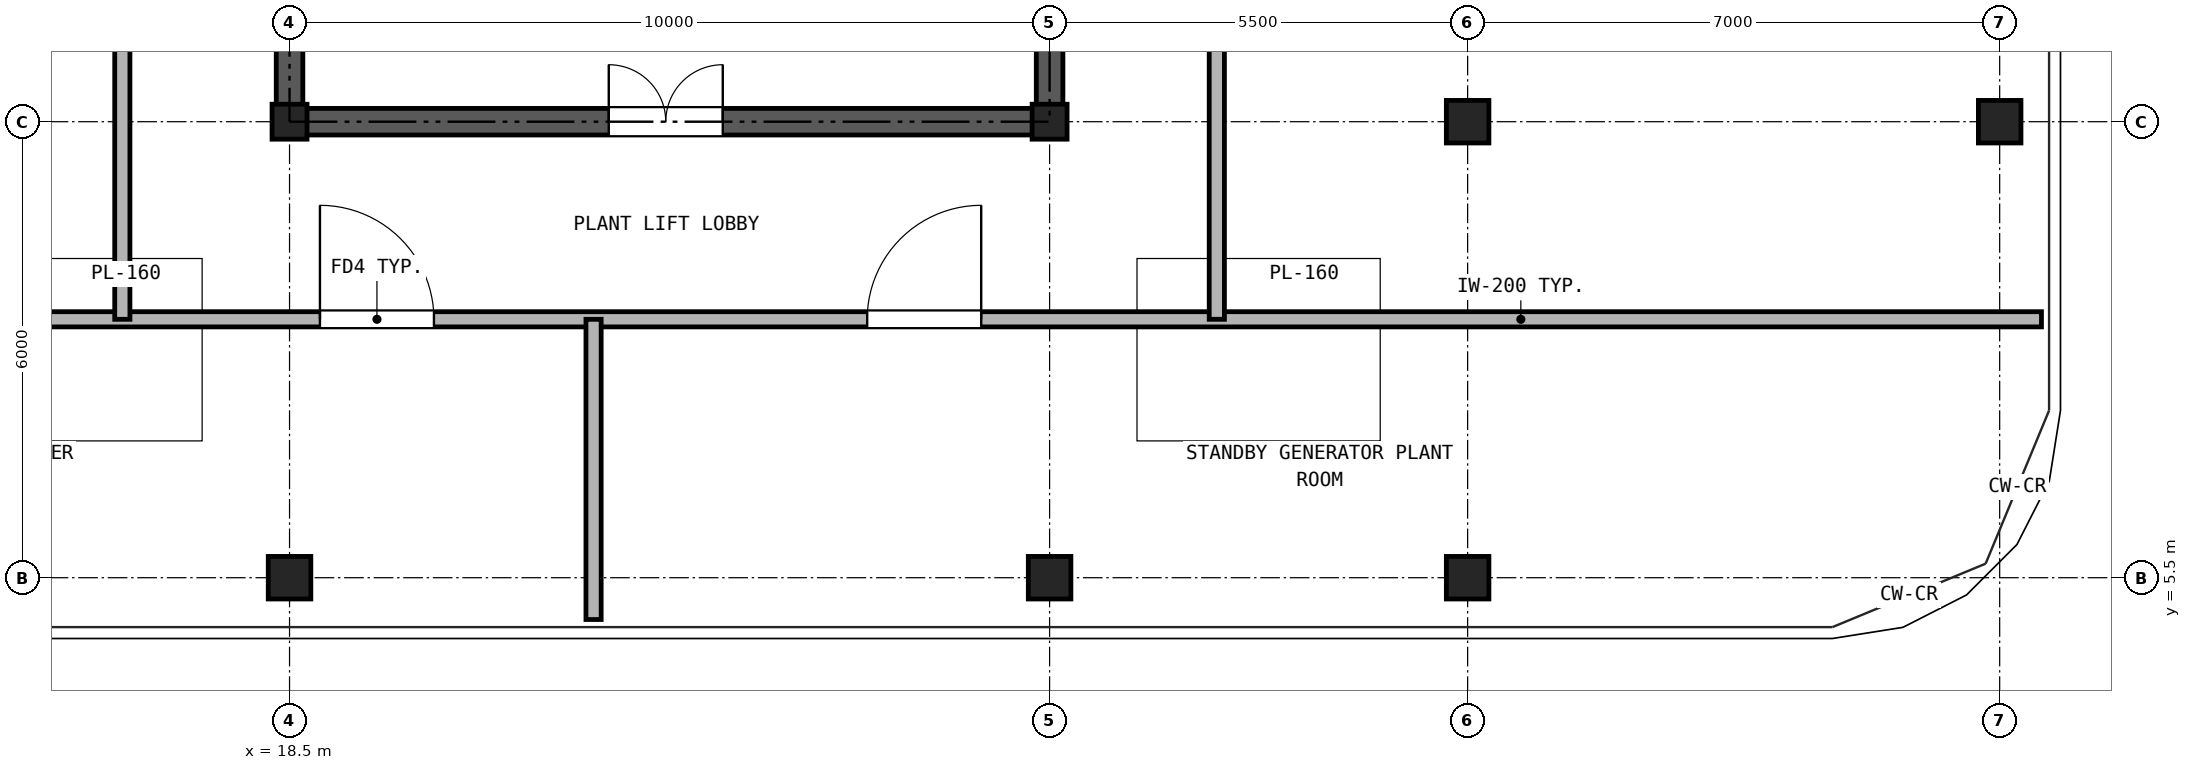
"""IFC4 building model, lengths in metres.
Left out: names, types, materials, properties, quantities, classifications, styles, units other than length and angle.
Written with IfcOpenShell. Run it as: python <this file> out.ifc"""

import sys

from ifc_helpers import new_model, si_unit, direction, frame, frame_2d, origin, origin_2d, place, context, subcontext, project, spatial, rectangle, hollow_rectangle, extrude, source, transform, mapped, element, fill, save


model = new_model("IFC4")
c1 = context("Model", 3, precision=1e-05, world=origin(), true_north=direction((0.0, 1.0)))
c2 = subcontext(c1, "Body", "Model", "MODEL_VIEW")
j1 = project(units=[si_unit("LENGTHUNIT", "METRE"), si_unit("PLANEANGLEUNIT", "RADIAN")], contexts=[c1])
p1 = place(None, origin())
s1 = spatial("IfcSite", under=j1, at=p1, CompositionType="ELEMENT")
p2 = place(p1, origin())
s2 = spatial("IfcBuilding", under=s1, at=p2, CompositionType="ELEMENT")
p3 = place(p2, frame((0.0, 0.0, 274.9)))
s3 = spatial("IfcBuildingStorey", under=s2, at=p3, CompositionType="ELEMENT", Elevation=274.9)
m1 = source(origin(), c2, "Body", "SweptSolid", [
    extrude(hollow_rectangle(XDim=0.56, YDim=0.56, WallThickness=0.03, at=origin_2d()), origin(), (0.0, 0.0, 1.0), 3.38),
])
for number, where, z_axis, x_axis in (
    (1, (18.5, 5.5, 0.0), (0.0, 0.0, 1.0), (1.0, 0.0, 0.0)),
    (2, (28.5, 5.5, 0.0), (0.0, 0.0, 1.0), (1.0, 0.0, 0.0)),
    (3, (34.0, 5.5, 0.0), (0.0, 0.0, 1.0), (1.0, 0.0, 0.0)),
    (4, (41.0, 11.5, 0.0), (0.0, 0.0, 1.0), (1.0, 0.0, 0.0)),
):
    element("IfcColumn", number, at=place(p3, frame(where, z_axis=z_axis, x_axis=x_axis)), inside=s3, PredefinedType="COLUMN", context=c2, shape_type="MappedRepresentation", body=[
        mapped(m1, transform((0.0, 0.0, 0.0), x_axis=(1.0, 0.0, 0.0), y_axis=(0.0, 1.0, 0.0), z_axis=(0.0, 0.0, 1.0), scale=1.0)),
    ])
m2 = source(origin(), c2, "Body", "SweptSolid", [
    extrude(hollow_rectangle(XDim=0.46, YDim=0.46, WallThickness=0.025, at=origin_2d()), origin(), (0.0, 0.0, 1.0), 3.38),
])
for number, where, z_axis, x_axis in (
    (5, (18.5, 11.5, 0.0), (0.0, 0.0, 1.0), (1.0, 0.0, 0.0)),
    (6, (28.5, 11.5, 0.0), (0.0, 0.0, 1.0), (1.0, 0.0, 0.0)),
):
    element("IfcColumn", number, at=place(p3, frame(where, z_axis=z_axis, x_axis=x_axis)), inside=s3, PredefinedType="COLUMN", context=c2, shape_type="MappedRepresentation", body=[
        mapped(m2, transform((0.0, 0.0, 0.0), x_axis=(1.0, 0.0, 0.0), y_axis=(0.0, 1.0, 0.0), z_axis=(0.0, 0.0, 1.0), scale=1.0)),
    ])
p4 = place(p3, frame((34.0, 11.5, 0.0), z_axis=(0.0, 0.0, 1.0), x_axis=(1.0, 0.0, 0.0)))
e7 = element("IfcColumn", 7, at=p4, inside=s3, PredefinedType="COLUMN", context=c2, shape_type="MappedRepresentation", body=[
    mapped(m1, transform((0.0, 0.0, 0.0), x_axis=(1.0, 0.0, 0.0), y_axis=(0.0, 1.0, 0.0), z_axis=(0.0, 0.0, 1.0), scale=1.0)),
])
p5 = place(p3, frame((18.325, 11.5, 0.0), z_axis=(0.0, 0.0, 1.0), x_axis=(1.0, 0.0, 0.0)))
e8 = element("IfcWall", 8, at=p5, inside=s3, PredefinedType="SHEAR", context=c2, shape_type="SweptSolid", body=[
    extrude(rectangle(XDim=10.35, YDim=0.35, at=frame_2d((5.175, 0.0))), origin(), (0.0, 0.0, 1.0), 3.38),
])
p6 = place(p5, frame((4.375, 0.0, 0.0)))
e9 = element("IfcOpeningElement", 9, at=p6, cuts=e8, PredefinedType="OPENING", context=c2, shape_type="SweptSolid", body=[
    extrude(rectangle(XDim=1.5, YDim=2.25, at=frame_2d((0.75, 1.125))), frame((0.0, 0.185, 0.0), z_axis=(0.0, -1.0, 0.0), x_axis=(1.0, 0.0, 0.0)), (0.0, 0.0, 1.0), 0.37),
])
p7 = place(p3, frame((18.5, 11.675, 0.0), z_axis=(0.0, 0.0, 1.0), x_axis=(0.0, 1.0, 0.0)))
e10 = element("IfcWall", 10, at=p7, inside=s3, PredefinedType="SHEAR", context=c2, shape_type="SweptSolid", body=[
    extrude(rectangle(XDim=16.9, YDim=0.35, at=frame_2d((8.45, 0.0))), origin(), (0.0, 0.0, 1.0), 3.38),
])
p8 = place(p7, frame((7.475, 0.0, 0.0)))
e11 = element("IfcOpeningElement", 11, at=p8, cuts=e10, PredefinedType="OPENING", context=c2, shape_type="SweptSolid", body=[
    extrude(rectangle(XDim=1.15, YDim=2.2, at=frame_2d((0.575, 1.1))), frame((0.0, 0.185, 0.0), z_axis=(0.0, -1.0, 0.0), x_axis=(1.0, 0.0, 0.0)), (0.0, 0.0, 1.0), 0.37),
])
p9 = place(p3, frame((28.5, 11.675, 0.0), z_axis=(0.0, 0.0, 1.0), x_axis=(0.0, 1.0, 0.0)))
e12 = element("IfcWall", 12, at=p9, inside=s3, PredefinedType="SHEAR", context=c2, shape_type="SweptSolid", body=[
    extrude(rectangle(XDim=16.9, YDim=0.35, at=frame_2d((8.45, 0.0))), origin(), (0.0, 0.0, 1.0), 3.38),
])
p10 = place(p9, frame((7.475, 0.0, 0.0)))
e13 = element("IfcOpeningElement", 13, at=p10, cuts=e12, PredefinedType="OPENING", context=c2, shape_type="SweptSolid", body=[
    extrude(rectangle(XDim=1.15, YDim=2.2, at=frame_2d((0.575, 1.1))), frame((0.0, 0.185, 0.0), z_axis=(0.0, -1.0, 0.0), x_axis=(1.0, 0.0, 0.0)), (0.0, 0.0, 1.0), 0.37),
])
p11 = place(p3, frame((5.45, 8.9, 0.0), z_axis=(0.0, 0.0, 1.0), x_axis=(1.0, 0.0, 0.0)))
e14 = element("IfcWall", 14, at=p11, inside=s3, PredefinedType="PARTITIONING", context=c2, shape_type="SweptSolid", body=[
    extrude(rectangle(XDim=36.1, YDim=0.2, at=frame_2d((18.05, 0.0))), origin(), (0.0, 0.0, 1.0), 3.38),
])
p12 = place(p11, frame((13.45, 0.0, 0.0)))
e15 = element("IfcOpeningElement", 15, at=p12, cuts=e14, PredefinedType="OPENING", context=c2, shape_type="SweptSolid", body=[
    extrude(rectangle(XDim=1.5, YDim=2.25, at=frame_2d((0.75, 1.125))), frame((0.0, 0.11, 0.0), z_axis=(0.0, -1.0, 0.0), x_axis=(1.0, 0.0, 0.0)), (0.0, 0.0, 1.0), 0.22),
])
p13 = place(p11, frame((20.65, 0.0, 0.0)))
e16 = element("IfcOpeningElement", 16, at=p13, cuts=e14, PredefinedType="OPENING", context=c2, shape_type="SweptSolid", body=[
    extrude(rectangle(XDim=1.5, YDim=2.25, at=frame_2d((0.75, 1.125))), frame((0.0, 0.11, 0.0), z_axis=(0.0, -1.0, 0.0), x_axis=(1.0, 0.0, 0.0)), (0.0, 0.0, 1.0), 0.22),
])
p14 = place(p3, frame((16.3, 8.9, 0.0), z_axis=(0.0, 0.0, 1.0), x_axis=(0.0, 1.0, 0.0)))
e17 = element("IfcWall", 17, at=p14, inside=s3, PredefinedType="PARTITIONING", context=c2, shape_type="SweptSolid", body=[
    extrude(rectangle(XDim=19.85, YDim=0.2, at=frame_2d((9.925, 0.0))), origin(), (0.0, 0.0, 1.0), 3.38),
])
p15 = place(p14, frame((4.55, 0.0, 0.0)))
e18 = element("IfcOpeningElement", 18, at=p15, cuts=e17, PredefinedType="OPENING", context=c2, shape_type="SweptSolid", body=[
    extrude(rectangle(XDim=1.05, YDim=2.15, at=frame_2d((0.525, 1.075))), frame((0.0, 0.11, 0.0), z_axis=(0.0, -1.0, 0.0), x_axis=(1.0, 0.0, 0.0)), (0.0, 0.0, 1.0), 0.22),
])
p16 = place(p14, frame((14.475, 0.0, 0.0)))
e19 = element("IfcOpeningElement", 19, at=p16, cuts=e17, PredefinedType="OPENING", context=c2, shape_type="SweptSolid", body=[
    extrude(rectangle(XDim=1.05, YDim=2.15, at=frame_2d((0.525, 1.075))), frame((0.0, 0.11, 0.0), z_axis=(0.0, -1.0, 0.0), x_axis=(1.0, 0.0, 0.0)), (0.0, 0.0, 1.0), 0.22),
])
p17 = place(p3, frame((30.7, 8.9, 0.0), z_axis=(0.0, 0.0, 1.0), x_axis=(0.0, 1.0, 0.0)))
e20 = element("IfcWall", 20, at=p17, inside=s3, PredefinedType="PARTITIONING", context=c2, shape_type="SweptSolid", body=[
    extrude(rectangle(XDim=19.85, YDim=0.2, at=frame_2d((9.925, 0.0))), origin(), (0.0, 0.0, 1.0), 3.38),
])
p18 = place(p17, frame((9.425, 0.0, 0.0)))
e21 = element("IfcOpeningElement", 21, at=p18, cuts=e20, PredefinedType="OPENING", context=c2, shape_type="SweptSolid", body=[
    extrude(rectangle(XDim=1.05, YDim=2.15, at=frame_2d((0.525, 1.075))), frame((0.0, 0.11, 0.0), z_axis=(0.0, -1.0, 0.0), x_axis=(1.0, 0.0, 0.0)), (0.0, 0.0, 1.0), 0.22),
])
p19 = place(p3, frame((22.5, 4.95, 0.0), z_axis=(0.0, 0.0, 1.0), x_axis=(0.0, 1.0, 0.0)))
e22 = element("IfcWall", 22, at=p19, inside=s3, PredefinedType="PARTITIONING", context=c2, shape_type="SweptSolid", body=[
    extrude(rectangle(XDim=3.95, YDim=0.2, at=frame_2d((1.975, 0.0))), origin(), (0.0, 0.0, 1.0), 3.38),
])
p20 = place(p6, frame((1.5, 0.0, 0.0), z_axis=(0.0, 0.0, 1.0), x_axis=(-1.0, 0.0, 0.0)))
e23 = element("IfcDoor", 23, at=p20, inside=s3, OperationType="DOUBLE_DOOR_SINGLE_SWING", PredefinedType="DOOR", context=c2, shape_type="SweptSolid", body=[
    extrude(rectangle(XDim=1.5, YDim=2.25, at=frame_2d((0.75, 1.125))), frame((0.0, 0.025, 0.0), z_axis=(0.0, -1.0, 0.0), x_axis=(1.0, 0.0, 0.0)), (0.0, 0.0, 1.0), 0.05),
])
fill(e9, e23)
p21 = place(p12, frame((1.5, 0.0, 0.0), z_axis=(0.0, 0.0, 1.0), x_axis=(-1.0, 0.0, 0.0)))
e24 = element("IfcDoor", 24, at=p21, inside=s3, OperationType="SINGLE_SWING_LEFT", PredefinedType="DOOR", context=c2, shape_type="SweptSolid", body=[
    extrude(rectangle(XDim=1.5, YDim=2.25, at=frame_2d((0.75, 1.125))), frame((0.0, 0.025, 0.0), z_axis=(0.0, -1.0, 0.0), x_axis=(1.0, 0.0, 0.0)), (0.0, 0.0, 1.0), 0.05),
])
fill(e15, e24)
p22 = place(p13, frame((1.5, 0.0, 0.0), z_axis=(0.0, 0.0, 1.0), x_axis=(-1.0, 0.0, 0.0)))
e25 = element("IfcDoor", 25, at=p22, inside=s3, OperationType="SINGLE_SWING_RIGHT", PredefinedType="DOOR", context=c2, shape_type="SweptSolid", body=[
    extrude(rectangle(XDim=1.5, YDim=2.25, at=frame_2d((0.75, 1.125))), frame((0.0, 0.025, 0.0), z_axis=(0.0, -1.0, 0.0), x_axis=(1.0, 0.0, 0.0)), (0.0, 0.0, 1.0), 0.05),
])
fill(e16, e25)
save(model, sys.argv[1])
